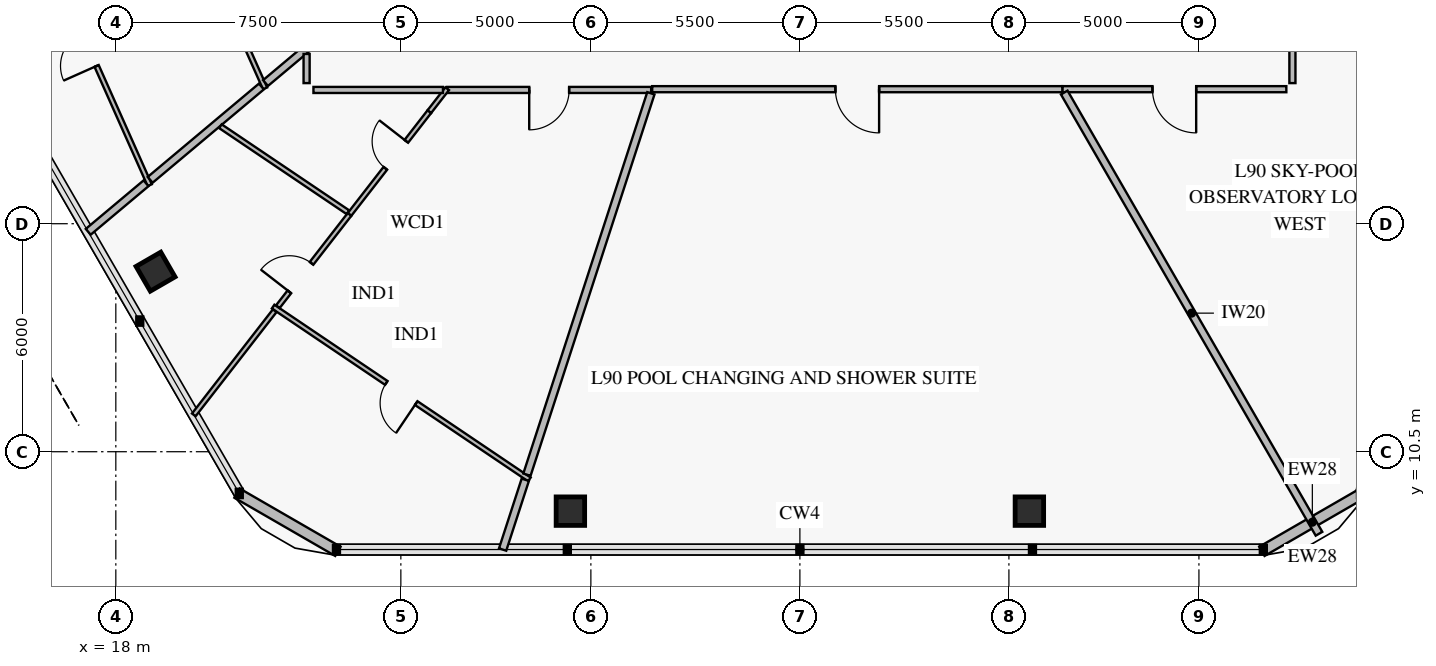
"""IFC4 building model, lengths in metres.
Left out: names, types, materials, properties, quantities, classifications, styles, units other than length and angle.
Written with IfcOpenShell. Run it as: python <this file> out.ifc"""

import sys

from ifc_helpers import new_model, si_unit, direction, frame, frame_2d, origin, origin_2d, place, context, subcontext, project, spatial, rectangle, extrude, element, fill, save


model = new_model("IFC4")
c1 = context("Model", 3, precision=1e-05, world=origin(), true_north=direction((0.0, 1.0)))
c2 = subcontext(c1, "Body", "Model", "MODEL_VIEW")
j1 = project(units=[si_unit("LENGTHUNIT", "METRE"), si_unit("PLANEANGLEUNIT", "RADIAN")], contexts=[c1])
p1 = place(None, origin())
s1 = spatial("IfcSite", under=j1, at=p1, CompositionType="ELEMENT")
p2 = place(p1, origin())
s2 = spatial("IfcBuilding", under=s1, at=p2, CompositionType="ELEMENT")
p3 = place(p2, frame((0.0, 0.0, 353.8)))
s3 = spatial("IfcBuildingStorey", under=s2, at=p3, CompositionType="ELEMENT", Elevation=353.8)
for number, where, z_axis, x_axis in (
    (1, (19.045, 15.238, 0.0), (0.0, 0.0, 1.0), (0.5, -0.866, 0.0)),
    (2, (29.961, 8.936, 0.0), (0.0, 0.0, 1.0), (1.0, 0.0, 0.0)),
    (3, (42.039, 8.936, 0.0), (0.0, 0.0, 1.0), (1.0, 0.0, 0.0)),
):
    element("IfcColumn", number, at=place(p3, frame(where, z_axis=z_axis, x_axis=x_axis)), inside=s3, PredefinedType="COLUMN", context=c2, shape_type="SweptSolid", body=[
        extrude(rectangle(XDim=0.75, YDim=0.75, at=origin_2d()), origin(), (0.0, 0.0, 1.0), 3.35),
    ])
for number, where, z_axis, x_axis in (
    (4, (50.811, 9.411, 0.0), (0.0, 0.0, 1.0), (-0.866, -0.5, 0.0)),
    (5, (23.843, 7.878, 0.0), (0.0, 0.0, 1.0), (-0.866, 0.5, 0.0)),
):
    element("IfcWall", number, at=place(p3, frame(where, z_axis=z_axis, x_axis=x_axis)), inside=s3, PredefinedType="SOLIDWALL", context=c2, shape_type="SweptSolid", body=[
        extrude(rectangle(XDim=3.065, YDim=0.28, at=frame_2d((1.532, 0.0))), origin(), (0.0, 0.0, 1.0), 3.35),
    ])
p4 = place(p3, frame((48.94, 24.529, 0.0), z_axis=(0.0, 0.0, 1.0), x_axis=(0.866028436312, -0.499994747472, 0.0)))
e6 = element("IfcWall", 6, at=p4, inside=s3, PredefinedType="PARTITIONING", context=c2, shape_type="SweptSolid", body=[
    extrude(rectangle(XDim=9.132, YDim=0.12, at=frame_2d((4.566, 0.0))), origin(), (0.0, 0.0, 1.0), 2.25),
])
p5 = place(p4, frame((3.991, 0.0, 0.0)))
e7 = element("IfcOpeningElement", 7, at=p5, cuts=e6, PredefinedType="OPENING", context=c2, shape_type="SweptSolid", body=[
    extrude(rectangle(XDim=0.95, YDim=2.1, at=frame_2d((0.475, 1.05))), frame((0.0, 0.072, 0.0), z_axis=(0.0, -1.0, 0.0), x_axis=(1.0, 0.0, 0.0)), (0.0, 0.0, 1.0), 0.144),
])
p6 = place(p3, frame((42.905, 20.04, 0.0), z_axis=(0.0, 0.0, 1.0), x_axis=(1.0, 0.0, 0.0)))
e8 = element("IfcWall", 8, at=p6, inside=s3, PredefinedType="PARTITIONING", context=c2, shape_type="SweptSolid", body=[
    extrude(rectangle(XDim=5.895, YDim=0.16, at=frame_2d((2.948, 0.0))), origin(), (0.0, 0.0, 1.0), 2.8),
])
p7 = place(p6, frame((2.372, 0.0, 0.0)))
e9 = element("IfcOpeningElement", 9, at=p7, cuts=e8, PredefinedType="OPENING", context=c2, shape_type="SweptSolid", body=[
    extrude(rectangle(XDim=1.15, YDim=2.2, at=frame_2d((0.575, 1.1))), frame((0.0, 0.092, 0.0), z_axis=(0.0, -1.0, 0.0), x_axis=(1.0, 0.0, 0.0)), (0.0, 0.0, 1.0), 0.184),
])
p8 = place(p3, frame((15.779, 24.504, 0.0), z_axis=(0.0, 0.0, 1.0), x_axis=(0.406754151675, -0.913537662111, 0.0)))
e10 = element("IfcWall", 10, at=p8, inside=s3, PredefinedType="PARTITIONING", context=c2, shape_type="SweptSolid", body=[
    extrude(rectangle(XDim=7.652, YDim=0.12, at=frame_2d((3.826, 0.0))), origin(), (0.0, 0.0, 1.0), 3.35),
])
p9 = place(p8, frame((3.267, 0.0, 0.0)))
e11 = element("IfcOpeningElement", 11, at=p9, cuts=e10, PredefinedType="OPENING", context=c2, shape_type="SweptSolid", body=[
    extrude(rectangle(XDim=0.95, YDim=2.1, at=frame_2d((0.475, 1.05))), frame((0.0, 0.072, 0.0), z_axis=(0.0, -1.0, 0.0), x_axis=(1.0, 0.0, 0.0)), (0.0, 0.0, 1.0), 0.144),
])
p10 = place(p3, frame((22.139, 14.319, 0.0), z_axis=(0.0, 0.0, 1.0), x_axis=(0.829032003146, -0.559201160371, 0.0)))
e12 = element("IfcWall", 12, at=p10, inside=s3, PredefinedType="PARTITIONING", context=c2, shape_type="SweptSolid", body=[
    extrude(rectangle(XDim=8.134, YDim=0.12, at=frame_2d((4.067, 0.0))), origin(), (0.0, 0.0, 1.0), 2.77),
])
p11 = place(p10, frame((3.592, 0.0, 0.0)))
e13 = element("IfcOpeningElement", 13, at=p11, cuts=e12, PredefinedType="OPENING", context=c2, shape_type="SweptSolid", body=[
    extrude(rectangle(XDim=0.95, YDim=2.1, at=frame_2d((0.475, 1.05))), frame((0.0, 0.072, 0.0), z_axis=(0.0, -1.0, 0.0), x_axis=(1.0, 0.0, 0.0)), (0.0, 0.0, 1.0), 0.144),
])
p12 = place(p3, frame((26.251, 19.45, 0.0), z_axis=(0.0, 0.0, 1.0), x_axis=(-0.613467016109, -0.789720342999, 0.0)))
e14 = element("IfcWall", 14, at=p12, inside=s3, PredefinedType="PARTITIONING", context=c2, shape_type="SweptSolid", body=[
    extrude(rectangle(XDim=3.427, YDim=0.12, at=frame_2d((1.713, 0.0))), origin(), (0.0, 0.0, 1.0), 3.35),
])
p13 = place(p12, frame((0.989, 0.0, 0.0)))
e15 = element("IfcOpeningElement", 15, at=p13, cuts=e14, PredefinedType="OPENING", context=c2, shape_type="SweptSolid", body=[
    extrude(rectangle(XDim=0.9, YDim=2.1, at=frame_2d((0.45, 1.05))), frame((0.0, 0.072, 0.0), z_axis=(0.0, -1.0, 0.0), x_axis=(1.0, 0.0, 0.0)), (0.0, 0.0, 1.0), 0.144),
])
p14 = place(p3, frame((24.149, 16.744, 0.0), z_axis=(0.0, 0.0, 1.0), x_axis=(-0.613439949778, -0.789741367801, 0.0)))
e16 = element("IfcWall", 16, at=p14, inside=s3, PredefinedType="PARTITIONING", context=c2, shape_type="SweptSolid", body=[
    extrude(rectangle(XDim=3.073, YDim=0.12, at=frame_2d((1.536, 0.0))), origin(), (0.0, 0.0, 1.0), 3.35),
])
p15 = place(p14, frame((1.628, 0.0, 0.0)))
e17 = element("IfcOpeningElement", 17, at=p15, cuts=e16, PredefinedType="OPENING", context=c2, shape_type="SweptSolid", body=[
    extrude(rectangle(XDim=0.95, YDim=2.1, at=frame_2d((0.475, 1.05))), frame((0.0, 0.072, 0.0), z_axis=(0.0, -1.0, 0.0), x_axis=(1.0, 0.0, 0.0)), (0.0, 0.0, 1.0), 0.144),
])
p16 = place(p3, frame((22.18, 14.209, 0.0), z_axis=(0.0, 0.0, 1.0), x_axis=(-0.613468009704, -0.789719571158, 0.0)))
e18 = element("IfcWall", 18, at=p16, inside=s3, PredefinedType="PARTITIONING", context=c2, shape_type="SweptSolid", body=[
    extrude(rectangle(XDim=3.47, YDim=0.12, at=frame_2d((1.735, 0.0))), origin(), (0.0, 0.0, 1.0), 2.77),
])
p17 = place(p3, frame((26.719, 20.02, 0.0), z_axis=(0.0, 0.0, 1.0), x_axis=(1.0, 0.0, 0.0)))
e19 = element("IfcWall", 19, at=p17, inside=s3, PredefinedType="PARTITIONING", context=c2, shape_type="SweptSolid", body=[
    extrude(rectangle(XDim=5.367, YDim=0.16, at=frame_2d((2.684, 0.0))), origin(), (0.0, 0.0, 1.0), 3.35),
])
p18 = place(p17, frame((2.158, 0.0, 0.0)))
e20 = element("IfcOpeningElement", 20, at=p18, cuts=e19, PredefinedType="OPENING", context=c2, shape_type="SweptSolid", body=[
    extrude(rectangle(XDim=1.05, YDim=2.15, at=frame_2d((0.525, 1.075))), frame((0.0, 0.092, 0.0), z_axis=(0.0, -1.0, 0.0), x_axis=(1.0, 0.0, 0.0)), (0.0, 0.0, 1.0), 0.184),
])
p19 = place(p3, frame((32.114, 20.04, 0.0), z_axis=(0.0, 0.0, 1.0), x_axis=(1.0, 0.0, 0.0)))
e21 = element("IfcWall", 21, at=p19, inside=s3, PredefinedType="PARTITIONING", context=c2, shape_type="SweptSolid", body=[
    extrude(rectangle(XDim=10.791, YDim=0.16, at=frame_2d((5.396, 0.0))), origin(), (0.0, 0.0, 1.0), 2.8),
])
p20 = place(p19, frame((4.821, 0.0, 0.0)))
e22 = element("IfcOpeningElement", 22, at=p20, cuts=e21, PredefinedType="OPENING", context=c2, shape_type="SweptSolid", body=[
    extrude(rectangle(XDim=1.15, YDim=2.2, at=frame_2d((0.575, 1.1))), frame((0.0, 0.092, 0.0), z_axis=(0.0, -1.0, 0.0), x_axis=(1.0, 0.0, 0.0)), (0.0, 0.0, 1.0), 0.184),
])
p21 = place(p3, frame((42.956, 19.952, 0.0), z_axis=(0.0, 0.0, 1.0), x_axis=(0.499999361477, -0.866025772436, 0.0)))
e23 = element("IfcWall", 23, at=p21, inside=s3, PredefinedType="PARTITIONING", context=c2, shape_type="SweptSolid", body=[
    extrude(rectangle(XDim=13.407, YDim=0.2, at=frame_2d((6.703, 0.0))), origin(), (0.0, 0.0, 1.0), 2.77),
])
p22 = place(p3, frame((48.96, 20.2, 0.0), z_axis=(0.0, 0.0, 1.0), x_axis=(0.0, 1.0, 0.0)))
e24 = element("IfcWall", 24, at=p22, inside=s3, PredefinedType="PARTITIONING", context=c2, shape_type="SweptSolid", body=[
    extrude(rectangle(XDim=4.239, YDim=0.16, at=frame_2d((2.12, 0.0))), origin(), (0.0, 0.0, 1.0), 3.35),
])
p23 = place(p3, frame((19.363, 25.82, 0.0), z_axis=(0.0, 0.0, 1.0), x_axis=(0.406702567346, -0.913560628374, 0.0)))
e25 = element("IfcWall", 25, at=p23, inside=s3, PredefinedType="PARTITIONING", context=c2, shape_type="SweptSolid", body=[
    extrude(rectangle(XDim=6.304, YDim=0.12, at=frame_2d((3.152, 0.0))), origin(), (0.0, 0.0, 1.0), 3.0),
])
p24 = place(p3, frame((23.06, 21.142, 0.0), z_axis=(0.0, 0.0, 1.0), x_axis=(-0.766056395585, -0.642773365024, 0.0)))
e26 = element("IfcWall", 26, at=p24, inside=s3, PredefinedType="PARTITIONING", context=c2, shape_type="SweptSolid", body=[
    extrude(rectangle(XDim=1.463, YDim=0.2, at=frame_2d((0.732, 0.0))), origin(), (0.0, 0.0, 1.0), 3.35),
])
p25 = place(p3, frame((21.831, 20.111, 0.0), z_axis=(0.0, 0.0, 1.0), x_axis=(-0.766011894934, -0.642826397108, 0.0)))
e27 = element("IfcWall", 27, at=p25, inside=s3, PredefinedType="PARTITIONING", context=c2, shape_type="SweptSolid", body=[
    extrude(rectangle(XDim=3.821, YDim=0.2, at=frame_2d((1.911, 0.0))), origin(), (0.0, 0.0, 1.0), 3.0),
])
p26 = place(p3, frame((18.795, 17.563, 0.0), z_axis=(0.0, 0.0, 1.0), x_axis=(-0.766060718976, -0.642768212376, 0.0)))
e28 = element("IfcWall", 28, at=p26, inside=s3, PredefinedType="PARTITIONING", context=c2, shape_type="SweptSolid", body=[
    extrude(rectangle(XDim=1.986, YDim=0.2, at=frame_2d((0.993, 0.0))), origin(), (0.0, 0.0, 1.0), 2.77),
])
p27 = place(p3, frame((26.719, 20.052, 0.0), z_axis=(0.0, 0.0, 1.0), x_axis=(-0.613430954659, -0.789748354773, 0.0)))
e29 = element("IfcWall", 29, at=p27, inside=s3, PredefinedType="PARTITIONING", context=c2, shape_type="SweptSolid", body=[
    extrude(rectangle(XDim=0.763, YDim=0.12, at=frame_2d((0.381, 0.0))), origin(), (0.0, 0.0, 1.0), 3.35),
])
p28 = place(p3, frame((20.752, 19.065, 0.0), z_axis=(0.0, 0.0, 1.0), x_axis=(0.829050018, -0.559174451896, 0.0)))
e30 = element("IfcWall", 30, at=p28, inside=s3, PredefinedType="PARTITIONING", context=c2, shape_type="SweptSolid", body=[
    extrude(rectangle(XDim=4.047, YDim=0.12, at=frame_2d((2.024, 0.0))), origin(), (0.0, 0.0, 1.0), 2.8),
])
p29 = place(p3, frame((32.079, 19.932, 0.0), z_axis=(0.0, 0.0, 1.0), x_axis=(-0.309007075995, -0.951059738915, 0.0)))
e31 = element("IfcWall", 31, at=p29, inside=s3, PredefinedType="PARTITIONING", context=c2, shape_type="SweptSolid", body=[
    extrude(rectangle(XDim=10.552, YDim=0.2, at=frame_2d((5.276, 0.0))), origin(), (0.0, 0.0, 1.0), 3.35),
])
p30 = place(p3, frame((28.774, 9.761, 0.0), z_axis=(0.0, 0.0, 1.0), x_axis=(-0.309008848905, -0.95105916288, 0.0)))
e32 = element("IfcWall", 32, at=p30, inside=s3, PredefinedType="PARTITIONING", context=c2, shape_type="SweptSolid", body=[
    extrude(rectangle(XDim=1.93, YDim=0.2, at=frame_2d((0.965, 0.0))), origin(), (0.0, 0.0, 1.0), 2.77),
])
p31 = place(p3, frame((23.2, 20.02, 0.0), z_axis=(0.0, 0.0, 1.0), x_axis=(1.0, 0.0, 0.0)))
e33 = element("IfcWall", 33, at=p31, inside=s3, PredefinedType="PARTITIONING", context=c2, shape_type="SweptSolid", body=[
    extrude(rectangle(XDim=3.408, YDim=0.16, at=frame_2d((1.704, 0.0))), origin(), (0.0, 0.0, 1.0), 2.8),
])
p32 = place(p3, frame((23.02, 20.968, 0.0), z_axis=(0.0, 0.0, 1.0), x_axis=(0.0, -1.0, 0.0)))
e34 = element("IfcWall", 34, at=p32, inside=s3, PredefinedType="PARTITIONING", context=c2, shape_type="SweptSolid", body=[
    extrude(rectangle(XDim=0.768, YDim=0.16, at=frame_2d((0.384, 0.0))), origin(), (0.0, 0.0, 1.0), 3.35),
])
p33 = place(p7, frame((1.15, 0.0, 0.0), z_axis=(0.0, 0.0, 1.0), x_axis=(-1.0, 0.0, 0.0)))
e35 = element("IfcDoor", 35, at=p33, inside=s3, OperationType="SINGLE_SWING_LEFT", PredefinedType="DOOR", context=c2, shape_type="SweptSolid", body=[
    extrude(rectangle(XDim=1.15, YDim=2.2, at=frame_2d((0.575, 1.1))), frame((0.0, 0.025, 0.0), z_axis=(0.0, -1.0, 0.0), x_axis=(1.0, 0.0, 0.0)), (0.0, 0.0, 1.0), 0.05),
])
fill(e9, e35)
p34 = place(p9, frame((0.95, 0.0, 0.0), z_axis=(0.0, 0.0, 1.0), x_axis=(-1.0, 0.0, 0.0)))
e36 = element("IfcDoor", 36, at=p34, inside=s3, OperationType="SINGLE_SWING_LEFT", PredefinedType="DOOR", context=c2, shape_type="SweptSolid", body=[
    extrude(rectangle(XDim=0.95, YDim=2.1, at=frame_2d((0.475, 1.05))), frame((0.0, 0.025, 0.0), z_axis=(0.0, -1.0, 0.0), x_axis=(1.0, 0.0, 0.0)), (0.0, 0.0, 1.0), 0.05),
])
fill(e11, e36)
p35 = place(p11, frame((0.95, 0.0, 0.0), z_axis=(0.0, 0.0, 1.0), x_axis=(-1.0, 0.0, 0.0)))
e37 = element("IfcDoor", 37, at=p35, inside=s3, OperationType="SINGLE_SWING_LEFT", PredefinedType="DOOR", context=c2, shape_type="SweptSolid", body=[
    extrude(rectangle(XDim=0.95, YDim=2.1, at=frame_2d((0.475, 1.05))), frame((0.0, 0.025, 0.0), z_axis=(0.0, -1.0, 0.0), x_axis=(1.0, 0.0, 0.0)), (0.0, 0.0, 1.0), 0.05),
])
fill(e13, e37)
p36 = place(p13, frame((0.9, 0.0, 0.0), z_axis=(0.0, 0.0, 1.0), x_axis=(-1.0, 0.0, 0.0)))
e38 = element("IfcDoor", 38, at=p36, inside=s3, OperationType="SINGLE_SWING_RIGHT", PredefinedType="DOOR", context=c2, shape_type="SweptSolid", body=[
    extrude(rectangle(XDim=0.9, YDim=2.1, at=frame_2d((0.45, 1.05))), frame((0.0, 0.025, 0.0), z_axis=(0.0, -1.0, 0.0), x_axis=(1.0, 0.0, 0.0)), (0.0, 0.0, 1.0), 0.05),
])
fill(e15, e38)
p37 = place(p15, frame((0.95, 0.0, 0.0), z_axis=(0.0, 0.0, 1.0), x_axis=(-1.0, 0.0, 0.0)))
e39 = element("IfcDoor", 39, at=p37, inside=s3, OperationType="SINGLE_SWING_LEFT", PredefinedType="DOOR", context=c2, shape_type="SweptSolid", body=[
    extrude(rectangle(XDim=0.95, YDim=2.1, at=frame_2d((0.475, 1.05))), frame((0.0, 0.025, 0.0), z_axis=(0.0, -1.0, 0.0), x_axis=(1.0, 0.0, 0.0)), (0.0, 0.0, 1.0), 0.05),
])
fill(e17, e39)
p38 = place(p18, frame((1.05, 0.0, 0.0), z_axis=(0.0, 0.0, 1.0), x_axis=(-1.0, 0.0, 0.0)))
e40 = element("IfcDoor", 40, at=p38, inside=s3, OperationType="SINGLE_SWING_RIGHT", PredefinedType="DOOR", context=c2, shape_type="SweptSolid", body=[
    extrude(rectangle(XDim=1.05, YDim=2.15, at=frame_2d((0.525, 1.075))), frame((0.0, 0.025, 0.0), z_axis=(0.0, -1.0, 0.0), x_axis=(1.0, 0.0, 0.0)), (0.0, 0.0, 1.0), 0.05),
])
fill(e20, e40)
p39 = place(p20, frame((1.15, 0.0, 0.0), z_axis=(0.0, 0.0, 1.0), x_axis=(-1.0, 0.0, 0.0)))
e41 = element("IfcDoor", 41, at=p39, inside=s3, OperationType="SINGLE_SWING_LEFT", PredefinedType="DOOR", context=c2, shape_type="SweptSolid", body=[
    extrude(rectangle(XDim=1.15, YDim=2.2, at=frame_2d((0.575, 1.1))), frame((0.0, 0.025, 0.0), z_axis=(0.0, -1.0, 0.0), x_axis=(1.0, 0.0, 0.0)), (0.0, 0.0, 1.0), 0.05),
])
fill(e22, e41)
save(model, sys.argv[1])
